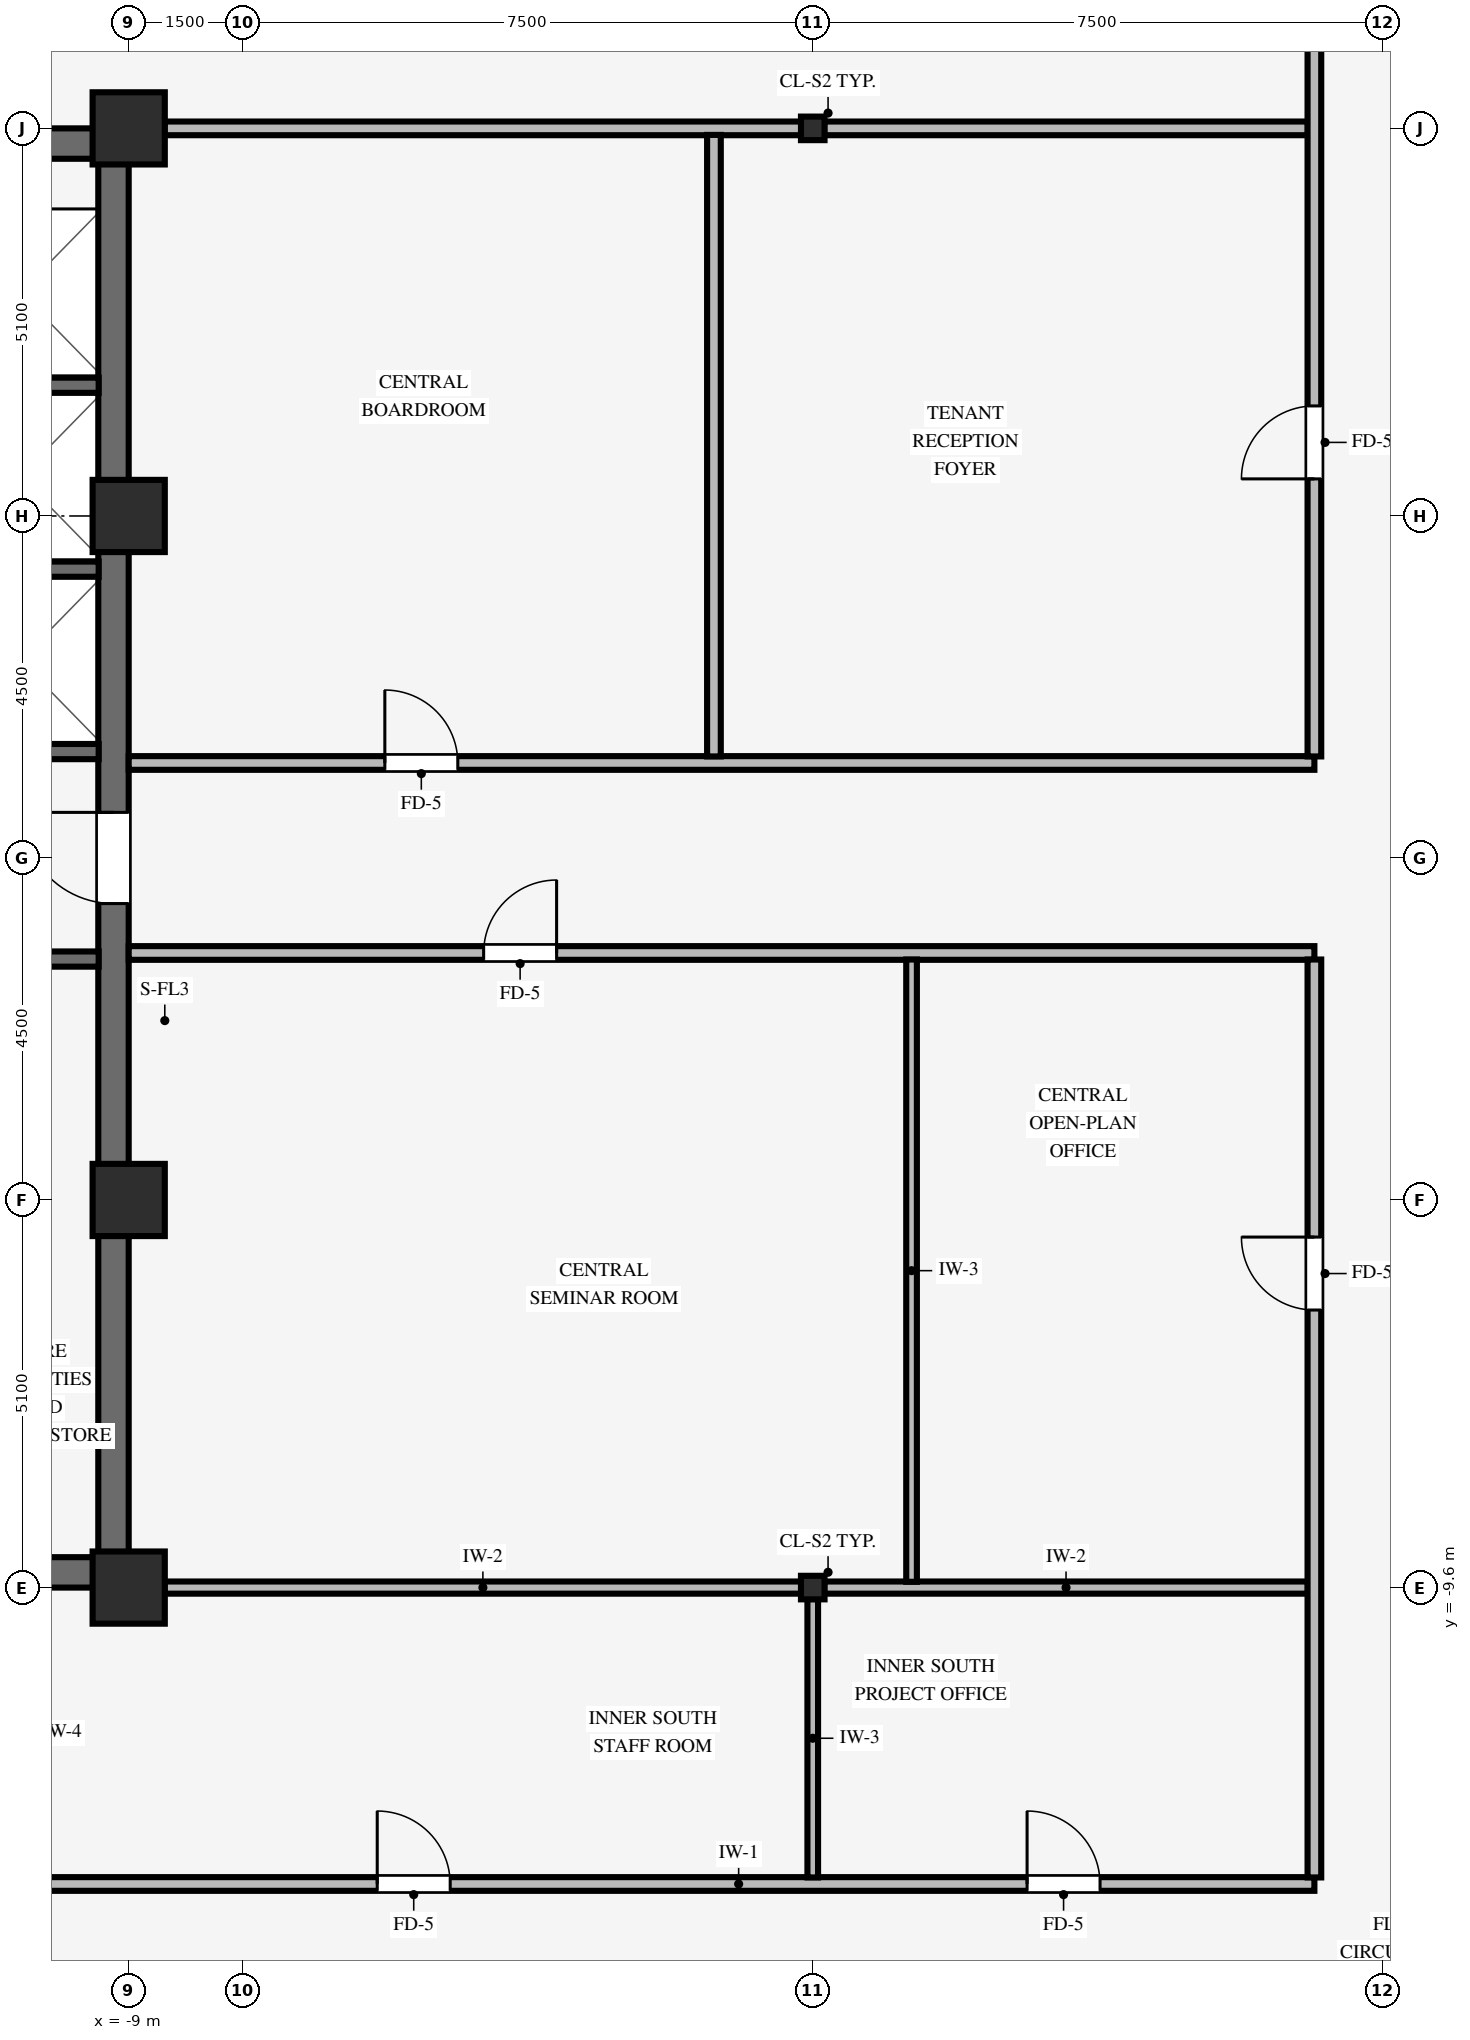
"""IFC4 building model, lengths in metres.
Left out: names, types, materials, properties, quantities, classifications, styles, units other than length and angle.
Written with IfcOpenShell. Run it as: python <this file> out.ifc"""

import sys

from ifc_helpers import new_model, si_unit, direction, frame, frame_2d, origin, origin_2d, place, context, subcontext, project, spatial, rectangle, i_section, extrude, source, transform, mapped, element, fill, save


model = new_model("IFC4")
c1 = context("Model", 3, precision=1e-05, world=origin(), true_north=direction((0.0, 1.0)))
c2 = subcontext(c1, "Body", "Model", "MODEL_VIEW")
j1 = project(units=[si_unit("LENGTHUNIT", "METRE"), si_unit("PLANEANGLEUNIT", "RADIAN")], contexts=[c1])
p1 = place(None, origin())
s1 = spatial("IfcSite", under=j1, at=p1, CompositionType="ELEMENT")
p2 = place(p1, origin())
s2 = spatial("IfcBuilding", under=s1, at=p2, CompositionType="ELEMENT")
p3 = place(p2, frame((0.0, 0.0, 167.65)))
s3 = spatial("IfcBuildingStorey", under=s2, at=p3, CompositionType="ELEMENT", Elevation=167.65)
for number, where, z_axis, x_axis in (
    (1, (-17.5, -9.4, 0.0), (0.0, 0.0, 1.0), (1.0, 0.0, 0.0)),
    (2, (-17.5, 9.4, 0.0), (0.0, 0.0, 1.0), (1.0, 0.0, 0.0)),
):
    element("IfcWall", number, at=place(p3, frame(where, z_axis=z_axis, x_axis=x_axis)), inside=s3, PredefinedType="SHEAR", context=c2, shape_type="SweptSolid", body=[
        extrude(rectangle(XDim=8.5, YDim=0.4, at=frame_2d((4.25, 0.0))), origin(), (0.0, 0.0, 1.0), 3.37),
    ])
p4 = place(p3, frame((-9.2, -9.205, 0.0), z_axis=(0.0, 0.0, 1.0), x_axis=(0.0, 1.0, 0.0)))
e3 = element("IfcWall", 3, at=p4, inside=s3, PredefinedType="SHEAR", context=c2, shape_type="SweptSolid", body=[
    extrude(rectangle(XDim=18.41, YDim=0.4, at=frame_2d((9.205, 0.0))), origin(), (0.0, 0.0, 1.0), 3.37),
])
p5 = place(p4, frame((8.605, 0.0, 0.0)))
e4 = element("IfcOpeningElement", 4, at=p5, cuts=e3, PredefinedType="OPENING", context=c2, shape_type="SweptSolid", body=[
    extrude(rectangle(XDim=1.2, YDim=2.15, at=frame_2d((0.6, 1.075))), frame((0.0, 0.21, 0.0), z_axis=(0.0, -1.0, 0.0), x_axis=(1.0, 0.0, 0.0)), (0.0, 0.0, 1.0), 0.42),
])
for number, where, z_axis, x_axis in (
    (5, (-9.0, -9.6, 0.0), (0.0, 0.0, 1.0), (1.0, 0.0, 0.0)),
    (6, (-9.0, -4.5, 0.0), (0.0, 0.0, 1.0), (1.0, 0.0, 0.0)),
    (7, (-9.0, 4.5, 0.0), (0.0, 0.0, 1.0), (1.0, 0.0, 0.0)),
    (8, (-9.0, 9.6, 0.0), (0.0, 0.0, 1.0), (1.0, 0.0, 0.0)),
):
    element("IfcColumn", number, at=place(p3, frame(where, z_axis=z_axis, x_axis=x_axis)), inside=s3, PredefinedType="COLUMN", context=c2, shape_type="SweptSolid", body=[
        extrude(rectangle(XDim=0.95, YDim=0.95, at=origin_2d()), origin(), (0.0, 0.0, 1.0), 3.37),
    ])
for number, where, z_axis, x_axis in (
    (9, (0.0, -9.6, 0.0), (0.0, 0.0, 1.0), (1.0, 0.0, 0.0)),
    (10, (0.0, 9.6, 0.0), (0.0, 0.0, 1.0), (1.0, 0.0, 0.0)),
):
    element("IfcColumn", number, at=place(p3, frame(where, z_axis=z_axis, x_axis=x_axis)), inside=s3, PredefinedType="COLUMN", context=c2, shape_type="SweptSolid", body=[
        extrude(i_section(OverallWidth=0.31, OverallDepth=0.31, WebThickness=0.015, FlangeThickness=0.015, FilletRadius=0.015, at=origin_2d()), origin(), (0.0, 0.0, 1.0), 3.37),
    ])
for number, where, z_axis, x_axis in (
    (11, (-11.505, -1.33, 0.0), (0.0, 0.0, 1.0), (1.0, 0.0, 0.0)),
    (12, (-11.505, 1.4, 0.0), (0.0, 0.0, 1.0), (1.0, 0.0, 0.0)),
    (13, (-11.505, 3.8, 0.0), (0.0, 0.0, 1.0), (1.0, 0.0, 0.0)),
    (14, (-11.505, 6.22, 0.0), (0.0, 0.0, 1.0), (1.0, 0.0, 0.0)),
):
    element("IfcWall", number, at=place(p3, frame(where, z_axis=z_axis, x_axis=x_axis)), inside=s3, PredefinedType="SHEAR", context=c2, shape_type="SweptSolid", body=[
        extrude(rectangle(XDim=2.11, YDim=0.2, at=frame_2d((1.055, 0.0))), origin(), (0.0, 0.0, 1.0), 3.37),
    ])
p6 = place(p3, frame((-17.7, -13.5, 0.0), z_axis=(0.0, 0.0, 1.0), x_axis=(1.0, 0.0, 0.0)))
e15 = element("IfcWall", 15, at=p6, inside=s3, PredefinedType="PARTITIONING", context=c2, shape_type="SweptSolid", body=[
    extrude(rectangle(XDim=24.3, YDim=0.18, at=frame_2d((12.15, 0.0))), origin(), (0.0, 0.0, 1.0), 3.008),
])
p7 = place(p6, frame((11.97, 0.0, 0.0)))
e16 = element("IfcOpeningElement", 16, at=p7, cuts=e15, PredefinedType="OPENING", context=c2, shape_type="SweptSolid", body=[
    extrude(rectangle(XDim=0.96, YDim=2.1, at=frame_2d((0.48, 1.05))), frame((0.0, 0.1, 0.0), z_axis=(0.0, -1.0, 0.0), x_axis=(1.0, 0.0, 0.0)), (0.0, 0.0, 1.0), 0.2),
])
p8 = place(p6, frame((20.52, 0.0, 0.0)))
e17 = element("IfcOpeningElement", 17, at=p8, cuts=e15, PredefinedType="OPENING", context=c2, shape_type="SweptSolid", body=[
    extrude(rectangle(XDim=0.96, YDim=2.1, at=frame_2d((0.48, 1.05))), frame((0.0, 0.1, 0.0), z_axis=(0.0, -1.0, 0.0), x_axis=(1.0, 0.0, 0.0)), (0.0, 0.0, 1.0), 0.2),
])
p9 = place(p6, frame((3.3, 0.0, 0.0)))
e18 = element("IfcOpeningElement", 18, at=p9, cuts=e15, PredefinedType="OPENING", context=c2, shape_type="SweptSolid", body=[
    extrude(rectangle(XDim=0.9, YDim=2.1, at=frame_2d((0.45, 1.05))), frame((0.0, 0.1, 0.0), z_axis=(0.0, -1.0, 0.0), x_axis=(1.0, 0.0, 0.0)), (0.0, 0.0, 1.0), 0.2),
])
p10 = place(p6, frame((5.65, 0.0, 0.0)))
e19 = element("IfcOpeningElement", 19, at=p10, cuts=e15, PredefinedType="OPENING", context=c2, shape_type="SweptSolid", body=[
    extrude(rectangle(XDim=0.9, YDim=2.1, at=frame_2d((0.45, 1.05))), frame((0.0, 0.1, 0.0), z_axis=(0.0, -1.0, 0.0), x_axis=(1.0, 0.0, 0.0)), (0.0, 0.0, 1.0), 0.2),
])
p11 = place(p3, frame((-8.529, -9.6, 0.0), z_axis=(0.0, 0.0, 1.0), x_axis=(1.0, 0.0, 0.0)))
e20 = element("IfcWall", 20, at=p11, inside=s3, PredefinedType="PARTITIONING", context=c2, shape_type="SweptSolid", body=[
    extrude(rectangle(XDim=8.378, YDim=0.16, at=frame_2d((4.189, 0.0))), origin(), (0.0, 0.0, 1.0), 2.405),
])
p12 = place(p3, frame((0.151, -9.6, 0.0), z_axis=(0.0, 0.0, 1.0), x_axis=(1.0, 0.0, 0.0)))
e21 = element("IfcWall", 21, at=p12, inside=s3, PredefinedType="PARTITIONING", context=c2, shape_type="SweptSolid", body=[
    extrude(rectangle(XDim=6.363, YDim=0.16, at=frame_2d((3.182, 0.0))), origin(), (0.0, 0.0, 1.0), 2.405),
])
p13 = place(p3, frame((-9.0, -1.25, 0.0), z_axis=(0.0, 0.0, 1.0), x_axis=(1.0, 0.0, 0.0)))
e22 = element("IfcWall", 22, at=p13, inside=s3, PredefinedType="PARTITIONING", context=c2, shape_type="SweptSolid", body=[
    extrude(rectangle(XDim=15.6, YDim=0.18, at=frame_2d((7.8, 0.0))), origin(), (0.0, 0.0, 1.0), 3.36),
])
p14 = place(p13, frame((4.67, 0.0, 0.0)))
e23 = element("IfcOpeningElement", 23, at=p14, cuts=e22, PredefinedType="OPENING", context=c2, shape_type="SweptSolid", body=[
    extrude(rectangle(XDim=0.96, YDim=2.1, at=frame_2d((0.48, 1.05))), frame((0.0, 0.1, 0.0), z_axis=(0.0, -1.0, 0.0), x_axis=(1.0, 0.0, 0.0)), (0.0, 0.0, 1.0), 0.2),
])
p15 = place(p3, frame((-9.0, 1.25, 0.0), z_axis=(0.0, 0.0, 1.0), x_axis=(1.0, 0.0, 0.0)))
e24 = element("IfcWall", 24, at=p15, inside=s3, PredefinedType="PARTITIONING", context=c2, shape_type="SweptSolid", body=[
    extrude(rectangle(XDim=15.6, YDim=0.18, at=frame_2d((7.8, 0.0))), origin(), (0.0, 0.0, 1.0), 3.36),
])
p16 = place(p15, frame((3.37, 0.0, 0.0)))
e25 = element("IfcOpeningElement", 25, at=p16, cuts=e24, PredefinedType="OPENING", context=c2, shape_type="SweptSolid", body=[
    extrude(rectangle(XDim=0.96, YDim=2.1, at=frame_2d((0.48, 1.05))), frame((0.0, 0.1, 0.0), z_axis=(0.0, -1.0, 0.0), x_axis=(1.0, 0.0, 0.0)), (0.0, 0.0, 1.0), 0.2),
])
p17 = place(p3, frame((-8.529, 9.6, 0.0), z_axis=(0.0, 0.0, 1.0), x_axis=(1.0, 0.0, 0.0)))
e26 = element("IfcWall", 26, at=p17, inside=s3, PredefinedType="PARTITIONING", context=c2, shape_type="SweptSolid", body=[
    extrude(rectangle(XDim=8.378, YDim=0.18, at=frame_2d((4.189, 0.0))), origin(), (0.0, 0.0, 1.0), 2.405),
])
p18 = place(p3, frame((0.151, 9.6, 0.0), z_axis=(0.0, 0.0, 1.0), x_axis=(1.0, 0.0, 0.0)))
e27 = element("IfcWall", 27, at=p18, inside=s3, PredefinedType="PARTITIONING", context=c2, shape_type="SweptSolid", body=[
    extrude(rectangle(XDim=6.363, YDim=0.18, at=frame_2d((3.182, 0.0))), origin(), (0.0, 0.0, 1.0), 2.405),
])
p19 = place(p3, frame((-1.3, 1.336, 0.0), z_axis=(0.0, 0.0, 1.0), x_axis=(0.0, 1.0, 0.0)))
e28 = element("IfcWall", 28, at=p19, inside=s3, PredefinedType="PARTITIONING", context=c2, shape_type="SweptSolid", body=[
    extrude(rectangle(XDim=8.178, YDim=0.18, at=frame_2d((4.089, 0.0))), origin(), (0.0, 0.0, 1.0), 3.36),
])
p20 = place(p3, frame((0.0, -13.414, 0.0), z_axis=(0.0, 0.0, 1.0), x_axis=(0.0, 1.0, 0.0)))
e29 = element("IfcWall", 29, at=p20, inside=s3, PredefinedType="PARTITIONING", context=c2, shape_type="SweptSolid", body=[
    extrude(rectangle(XDim=3.663, YDim=0.14, at=frame_2d((1.832, 0.0))), origin(), (0.0, 0.0, 1.0), 2.816),
])
p21 = place(p3, frame((1.3, -9.524, 0.0), z_axis=(0.0, 0.0, 1.0), x_axis=(0.0, 1.0, 0.0)))
e30 = element("IfcWall", 30, at=p21, inside=s3, PredefinedType="PARTITIONING", context=c2, shape_type="SweptSolid", body=[
    extrude(rectangle(XDim=8.188, YDim=0.14, at=frame_2d((4.094, 0.0))), origin(), (0.0, 0.0, 1.0), 3.36),
])
p22 = place(p3, frame((6.6, -13.414, 0.0), z_axis=(0.0, 0.0, 1.0), x_axis=(0.0, 1.0, 0.0)))
e31 = element("IfcWall", 31, at=p22, inside=s3, PredefinedType="PARTITIONING", context=c2, shape_type="SweptSolid", body=[
    extrude(rectangle(XDim=12.078, YDim=0.18, at=frame_2d((6.039, 0.0))), origin(), (0.0, 0.0, 1.0), 3.36),
])
p23 = place(p22, frame((7.466, 0.0, 0.0)))
e32 = element("IfcOpeningElement", 32, at=p23, cuts=e31, PredefinedType="OPENING", context=c2, shape_type="SweptSolid", body=[
    extrude(rectangle(XDim=0.96, YDim=2.1, at=frame_2d((0.48, 1.05))), frame((0.0, 0.1, 0.0), z_axis=(0.0, -1.0, 0.0), x_axis=(1.0, 0.0, 0.0)), (0.0, 0.0, 1.0), 0.2),
])
p24 = place(p3, frame((6.6, 1.336, 0.0), z_axis=(0.0, 0.0, 1.0), x_axis=(0.0, 1.0, 0.0)))
e33 = element("IfcWall", 33, at=p24, inside=s3, PredefinedType="PARTITIONING", context=c2, shape_type="SweptSolid", body=[
    extrude(rectangle(XDim=12.078, YDim=0.18, at=frame_2d((6.039, 0.0))), origin(), (0.0, 0.0, 1.0), 3.36),
])
p25 = place(p24, frame((3.652, 0.0, 0.0)))
e34 = element("IfcOpeningElement", 34, at=p25, cuts=e33, PredefinedType="OPENING", context=c2, shape_type="SweptSolid", body=[
    extrude(rectangle(XDim=0.96, YDim=2.1, at=frame_2d((0.48, 1.05))), frame((0.0, 0.1, 0.0), z_axis=(0.0, -1.0, 0.0), x_axis=(1.0, 0.0, 0.0)), (0.0, 0.0, 1.0), 0.2),
])
m1 = source(origin(), c2, "Body", "SweptSolid", [
    extrude(rectangle(XDim=1.2, YDim=2.15, at=frame_2d((0.6, 1.075))), frame((0.0, 0.025, 0.0), z_axis=(0.0, -1.0, 0.0), x_axis=(1.0, 0.0, 0.0)), (0.0, 0.0, 1.0), 0.05),
])
p26 = place(p5, origin())
e35 = element("IfcDoor", 35, at=p26, inside=s3, OperationType="SINGLE_SWING_RIGHT", PredefinedType="DOOR", context=c2, shape_type="MappedRepresentation", body=[
    mapped(m1, transform((0.0, 0.0, 0.0), scale=1.0)),
])
fill(e4, e35)
m2 = source(origin(), c2, "Body", "SweptSolid", [
    extrude(rectangle(XDim=0.96, YDim=2.1, at=frame_2d((0.48, 1.05))), frame((0.0, 0.025, 0.0), z_axis=(0.0, -1.0, 0.0), x_axis=(1.0, 0.0, 0.0)), (0.0, 0.0, 1.0), 0.05),
])
p27 = place(p7, origin())
e36 = element("IfcDoor", 36, at=p27, inside=s3, OperationType="SINGLE_SWING_LEFT", PredefinedType="DOOR", context=c2, shape_type="MappedRepresentation", body=[
    mapped(m2, transform((0.0, 0.0, 0.0), scale=1.0)),
])
fill(e16, e36)
p28 = place(p14, origin())
e37 = element("IfcDoor", 37, at=p28, inside=s3, OperationType="SINGLE_SWING_RIGHT", PredefinedType="DOOR", context=c2, shape_type="MappedRepresentation", body=[
    mapped(m2, transform((0.0, 0.0, 0.0), scale=1.0)),
])
fill(e23, e37)
p29 = place(p25, origin())
e38 = element("IfcDoor", 38, at=p29, inside=s3, OperationType="SINGLE_SWING_LEFT", PredefinedType="DOOR", context=c2, shape_type="MappedRepresentation", body=[
    mapped(m2, transform((0.0, 0.0, 0.0), scale=1.0)),
])
fill(e34, e38)
p30 = place(p23, origin())
e39 = element("IfcDoor", 39, at=p30, inside=s3, OperationType="SINGLE_SWING_RIGHT", PredefinedType="DOOR", context=c2, shape_type="MappedRepresentation", body=[
    mapped(m2, transform((0.0, 0.0, 0.0), scale=1.0)),
])
fill(e32, e39)
p31 = place(p16, origin())
e40 = element("IfcDoor", 40, at=p31, inside=s3, OperationType="SINGLE_SWING_LEFT", PredefinedType="DOOR", context=c2, shape_type="MappedRepresentation", body=[
    mapped(m2, transform((0.0, 0.0, 0.0), scale=1.0)),
])
fill(e25, e40)
p32 = place(p8, origin())
e41 = element("IfcDoor", 41, at=p32, inside=s3, OperationType="SINGLE_SWING_LEFT", PredefinedType="DOOR", context=c2, shape_type="MappedRepresentation", body=[
    mapped(m2, transform((0.0, 0.0, 0.0), scale=1.0)),
])
fill(e17, e41)
save(model, sys.argv[1])
